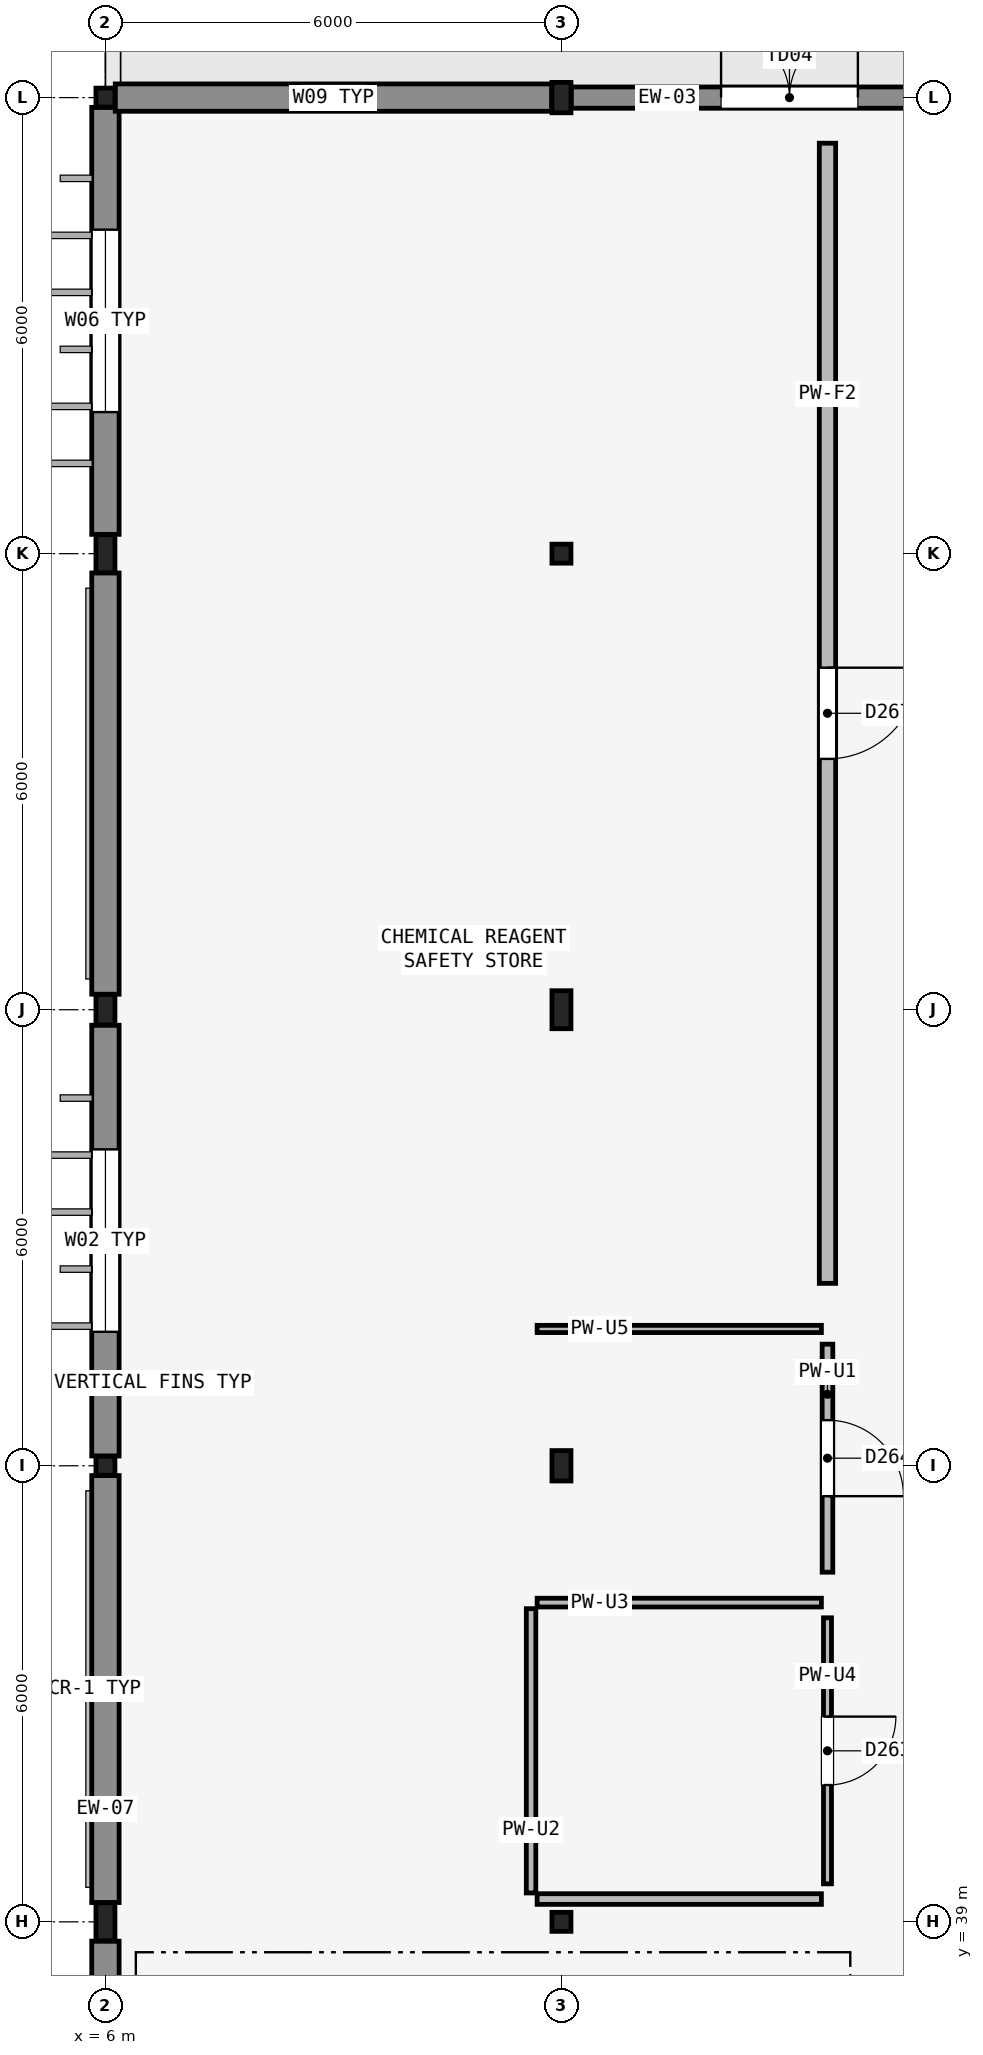
"""IFC4 building model, lengths in metres.
Left out: names, types, materials, properties, quantities, classifications, styles, units other than length and angle.
Written with IfcOpenShell. Run it as: python <this file> out.ifc"""

import sys

from ifc_helpers import new_model, si_unit, direction, frame, frame_2d, origin, origin_2d, place, context, subcontext, project, spatial, rectangle, hollow_rectangle, i_section, extrude, element, fill, save


model = new_model("IFC4")
c1 = context("Model", 3, precision=1e-05, world=origin(), true_north=direction((0.0, 1.0)))
c2 = subcontext(c1, "Body", "Model", "MODEL_VIEW")
j1 = project(units=[si_unit("LENGTHUNIT", "METRE"), si_unit("PLANEANGLEUNIT", "RADIAN")], contexts=[c1])
p1 = place(None, origin())
s1 = spatial("IfcSite", under=j1, at=p1, CompositionType="ELEMENT")
p2 = place(p1, origin())
s2 = spatial("IfcBuilding", under=s1, at=p2, CompositionType="ELEMENT")
p3 = place(p2, frame((0.0, 0.0, 18.0)))
s3 = spatial("IfcBuildingStorey", under=s2, at=p3, CompositionType="ELEMENT", Elevation=18.0)
p4 = place(p3, frame((6.0, 39.0, 0.0), z_axis=(0.0, 0.0, 1.0), x_axis=(1.0, 0.0, 0.0)))
e1 = element("IfcColumn", 1, at=p4, inside=s3, PredefinedType="COLUMN", context=c2, shape_type="SweptSolid", body=[
    extrude(i_section(OverallWidth=0.25, OverallDepth=0.5, WebThickness=0.01, FlangeThickness=0.015, FilletRadius=0.015, at=origin_2d()), origin(), (0.0, 0.0, 1.0), 4.2),
])
p5 = place(p3, frame((6.0, 45.0, 0.0), z_axis=(0.0, 0.0, 1.0), x_axis=(1.0, 0.0, 0.0)))
e2 = element("IfcColumn", 2, at=p5, inside=s3, PredefinedType="COLUMN", context=c2, shape_type="SweptSolid", body=[
    extrude(hollow_rectangle(XDim=0.25, YDim=0.25, WallThickness=0.012, InnerFilletRadius=0.012, OuterFilletRadius=0.024, at=origin_2d()), origin(), (0.0, 0.0, 1.0), 4.2),
])
p6 = place(p3, frame((6.0, 51.0, 0.0), z_axis=(0.0, 0.0, 1.0), x_axis=(1.0, 0.0, 0.0)))
e3 = element("IfcColumn", 3, at=p6, inside=s3, PredefinedType="COLUMN", context=c2, shape_type="SweptSolid", body=[
    extrude(i_section(OverallWidth=0.25, OverallDepth=0.4, WebThickness=0.01, FlangeThickness=0.013, FilletRadius=0.014, at=origin_2d()), origin(), (0.0, 0.0, 1.0), 4.2),
])
p7 = place(p3, frame((6.0, 57.0, 0.0), z_axis=(0.0, 0.0, 1.0), x_axis=(1.0, 0.0, 0.0)))
e4 = element("IfcColumn", 4, at=p7, inside=s3, PredefinedType="COLUMN", context=c2, shape_type="SweptSolid", body=[
    extrude(i_section(OverallWidth=0.25, OverallDepth=0.5, WebThickness=0.01, FlangeThickness=0.015, FilletRadius=0.015, at=origin_2d()), origin(), (0.0, 0.0, 1.0), 4.2),
])
for number, where, z_axis, x_axis in (
    (5, (6.0, 63.0, 0.0), (0.0, 0.0, 1.0), (1.0, 0.0, 0.0)),
    (6, (12.0, 39.0, 0.0), (0.0, 0.0, 1.0), (1.0, 0.0, 0.0)),
):
    element("IfcColumn", number, at=place(p3, frame(where, z_axis=z_axis, x_axis=x_axis)), inside=s3, PredefinedType="COLUMN", context=c2, shape_type="SweptSolid", body=[
        extrude(hollow_rectangle(XDim=0.25, YDim=0.25, WallThickness=0.012, InnerFilletRadius=0.012, OuterFilletRadius=0.024, at=origin_2d()), origin(), (0.0, 0.0, 1.0), 4.2),
    ])
p8 = place(p3, frame((12.0, 45.0, 0.0), z_axis=(0.0, 0.0, 1.0), x_axis=(1.0, 0.0, 0.0)))
e7 = element("IfcColumn", 7, at=p8, inside=s3, PredefinedType="COLUMN", context=c2, shape_type="SweptSolid", body=[
    extrude(i_section(OverallWidth=0.25, OverallDepth=0.4, WebThickness=0.01, FlangeThickness=0.013, FilletRadius=0.014, at=origin_2d()), origin(), (0.0, 0.0, 1.0), 4.2),
])
p9 = place(p3, frame((12.0, 51.0, 0.0), z_axis=(0.0, 0.0, 1.0), x_axis=(1.0, 0.0, 0.0)))
e8 = element("IfcColumn", 8, at=p9, inside=s3, PredefinedType="COLUMN", context=c2, shape_type="SweptSolid", body=[
    extrude(i_section(OverallWidth=0.25, OverallDepth=0.5, WebThickness=0.01, FlangeThickness=0.015, FilletRadius=0.015, at=origin_2d()), origin(), (0.0, 0.0, 1.0), 4.2),
])
p10 = place(p3, frame((12.0, 57.0, 0.0), z_axis=(0.0, 0.0, 1.0), x_axis=(1.0, 0.0, 0.0)))
e9 = element("IfcColumn", 9, at=p10, inside=s3, PredefinedType="COLUMN", context=c2, shape_type="SweptSolid", body=[
    extrude(hollow_rectangle(XDim=0.25, YDim=0.25, WallThickness=0.012, InnerFilletRadius=0.012, OuterFilletRadius=0.024, at=origin_2d()), origin(), (0.0, 0.0, 1.0), 4.2),
])
p11 = place(p3, frame((12.0, 63.0, 0.0), z_axis=(0.0, 0.0, 1.0), x_axis=(1.0, 0.0, 0.0)))
e10 = element("IfcColumn", 10, at=p11, inside=s3, PredefinedType="COLUMN", context=c2, shape_type="SweptSolid", body=[
    extrude(i_section(OverallWidth=0.25, OverallDepth=0.4, WebThickness=0.01, FlangeThickness=0.013, FilletRadius=0.014, at=origin_2d()), origin(), (0.0, 0.0, 1.0), 4.2),
])
p12 = place(p3, frame((6.0, 33.204, 0.0), z_axis=(0.0, 0.0, 1.0), x_axis=(0.0, 1.0, 0.0)))
e11 = element("IfcWall", 11, at=p12, inside=s3, PredefinedType="SOLIDWALL", context=c2, shape_type="SweptSolid", body=[
    extrude(rectangle(XDim=5.542, YDim=0.36, at=frame_2d((2.771, 0.0))), origin(), (0.0, 0.0, 1.0), 3.39),
])
p13 = place(p12, frame((1.171, 0.0, 0.8)))
e12 = element("IfcOpeningElement", 12, at=p13, cuts=e11, PredefinedType="OPENING", context=c2, shape_type="SweptSolid", body=[
    extrude(rectangle(XDim=3.2, YDim=1.8, at=frame_2d((1.6, 0.9))), frame((0.0, 0.19, 0.0), z_axis=(0.0, -1.0, 0.0), x_axis=(1.0, 0.0, 0.0)), (0.0, 0.0, 1.0), 0.38),
])
p14 = place(p3, frame((6.0, 39.254, 0.0), z_axis=(0.0, 0.0, 1.0), x_axis=(0.0, 1.0, 0.0)))
e13 = element("IfcWall", 13, at=p14, inside=s3, PredefinedType="SOLIDWALL", context=c2, shape_type="SweptSolid", body=[
    extrude(rectangle(XDim=5.617, YDim=0.36, at=frame_2d((2.809, 0.0))), origin(), (0.0, 0.0, 1.0), 3.29),
])
p15 = place(p3, frame((6.0, 45.129, 0.0), z_axis=(0.0, 0.0, 1.0), x_axis=(0.0, 1.0, 0.0)))
e14 = element("IfcWall", 14, at=p15, inside=s3, PredefinedType="SOLIDWALL", context=c2, shape_type="SweptSolid", body=[
    extrude(rectangle(XDim=5.667, YDim=0.36, at=frame_2d((2.833, 0.0))), origin(), (0.0, 0.0, 1.0), 3.29),
])
p16 = place(p15, frame((1.634, 0.0, 0.9)))
e15 = element("IfcOpeningElement", 15, at=p16, cuts=e14, PredefinedType="OPENING", context=c2, shape_type="SweptSolid", body=[
    extrude(rectangle(XDim=2.4, YDim=1.5, at=frame_2d((1.2, 0.75))), frame((0.0, 0.19, 0.0), z_axis=(0.0, -1.0, 0.0), x_axis=(1.0, 0.0, 0.0)), (0.0, 0.0, 1.0), 0.38),
])
p17 = place(p3, frame((6.0, 51.204, 0.0), z_axis=(0.0, 0.0, 1.0), x_axis=(0.0, 1.0, 0.0)))
e16 = element("IfcWall", 16, at=p17, inside=s3, PredefinedType="SOLIDWALL", context=c2, shape_type="SweptSolid", body=[
    extrude(rectangle(XDim=5.542, YDim=0.36, at=frame_2d((2.771, 0.0))), origin(), (0.0, 0.0, 1.0), 3.29),
])
p18 = place(p3, frame((6.0, 57.254, 0.0), z_axis=(0.0, 0.0, 1.0), x_axis=(0.0, 1.0, 0.0)))
e17 = element("IfcWall", 17, at=p18, inside=s3, PredefinedType="SOLIDWALL", context=c2, shape_type="SweptSolid", body=[
    extrude(rectangle(XDim=5.617, YDim=0.36, at=frame_2d((2.809, 0.0))), origin(), (0.0, 0.0, 1.0), 3.29),
])
p19 = place(p18, frame((1.608, 0.0, 1.1)))
e18 = element("IfcOpeningElement", 18, at=p19, cuts=e17, PredefinedType="OPENING", context=c2, shape_type="SweptSolid", body=[
    extrude(rectangle(XDim=2.4, YDim=1.2, at=frame_2d((1.2, 0.6))), frame((0.0, 0.19, 0.0), z_axis=(0.0, -1.0, 0.0), x_axis=(1.0, 0.0, 0.0)), (0.0, 0.0, 1.0), 0.38),
])
p20 = place(p3, frame((6.129, 63.0, 0.0), z_axis=(0.0, 0.0, 1.0), x_axis=(1.0, 0.0, 0.0)))
e19 = element("IfcWall", 19, at=p20, inside=s3, PredefinedType="SOLIDWALL", context=c2, shape_type="SweptSolid", body=[
    extrude(rectangle(XDim=5.742, YDim=0.36, at=frame_2d((2.871, 0.0))), origin(), (0.0, 0.0, 1.0), 3.29),
])
p21 = place(p20, frame((2.421, 0.0, 1.0)))
e20 = element("IfcOpeningElement", 20, at=p21, cuts=e19, PredefinedType="OPENING", context=c2, shape_type="SweptSolid", body=[
    extrude(rectangle(XDim=0.9, YDim=1.5, at=frame_2d((0.45, 0.75))), frame((0.0, 0.19, 0.0), z_axis=(0.0, -1.0, 0.0), x_axis=(1.0, 0.0, 0.0)), (0.0, 0.0, 1.0), 0.38),
])
p22 = place(p3, frame((12.129, 63.0, 0.0), z_axis=(0.0, 0.0, 1.0), x_axis=(1.0, 0.0, 0.0)))
e21 = element("IfcWall", 21, at=p22, inside=s3, PredefinedType="SOLIDWALL", context=c2, shape_type="SweptSolid", body=[
    extrude(rectangle(XDim=5.742, YDim=0.28, at=frame_2d((2.871, 0.0))), origin(), (0.0, 0.0, 1.0), 3.29),
])
p23 = place(p22, frame((1.971, 0.0, 0.0)))
e22 = element("IfcOpeningElement", 22, at=p23, cuts=e21, PredefinedType="OPENING", context=c2, shape_type="SweptSolid", body=[
    extrude(rectangle(XDim=1.8, YDim=2.3, at=frame_2d((0.9, 1.15))), frame((0.0, 0.15, 0.0), z_axis=(0.0, -1.0, 0.0), x_axis=(1.0, 0.0, 0.0)), (0.0, 0.0, 1.0), 0.3),
])
p24 = place(p3, frame((15.5, 43.0, 0.0), z_axis=(0.0, 0.0, 1.0), x_axis=(0.0, -1.0, 0.0)))
e23 = element("IfcWall", 23, at=p24, inside=s3, PredefinedType="PARTITIONING", context=c2, shape_type="SweptSolid", body=[
    extrude(rectangle(XDim=3.5, YDim=0.105, at=frame_2d((1.75, 0.0))), origin(), (0.0, 0.0, 1.0), 3.89),
])
p25 = place(p24, frame((1.3, 0.0, 0.0)))
e24 = element("IfcOpeningElement", 24, at=p25, cuts=e23, PredefinedType="OPENING", context=c2, shape_type="SweptSolid", body=[
    extrude(rectangle(XDim=0.9, YDim=2.1, at=frame_2d((0.45, 1.05))), frame((0.0, 0.062, 0.0), z_axis=(0.0, -1.0, 0.0), x_axis=(1.0, 0.0, 0.0)), (0.0, 0.0, 1.0), 0.125),
])
p26 = place(p3, frame((15.5, 46.6, 0.0), z_axis=(0.0, 0.0, 1.0), x_axis=(0.0, -1.0, 0.0)))
e25 = element("IfcWall", 25, at=p26, inside=s3, PredefinedType="PARTITIONING", context=c2, shape_type="SweptSolid", body=[
    extrude(rectangle(XDim=3.0, YDim=0.14, at=frame_2d((1.5, 0.0))), origin(), (0.0, 0.0, 1.0), 3.39),
])
p27 = place(p26, frame((1.0, 0.0, 0.0)))
e26 = element("IfcOpeningElement", 26, at=p27, cuts=e25, PredefinedType="OPENING", context=c2, shape_type="SweptSolid", body=[
    extrude(rectangle(XDim=1.0, YDim=2.1, at=frame_2d((0.5, 1.05))), frame((0.0, 0.08, 0.0), z_axis=(0.0, -1.0, 0.0), x_axis=(1.0, 0.0, 0.0)), (0.0, 0.0, 1.0), 0.16),
])
p28 = place(p3, frame((15.5, 62.4, 0.0), z_axis=(0.0, 0.0, 1.0), x_axis=(0.0, -1.0, 0.0)))
e27 = element("IfcWall", 27, at=p28, inside=s3, PredefinedType="PARTITIONING", context=c2, shape_type="SweptSolid", body=[
    extrude(rectangle(XDim=15.0, YDim=0.215, at=frame_2d((7.5, 0.0))), origin(), (0.0, 0.0, 1.0), 3.39),
])
p29 = place(p28, frame((6.9, 0.0, 0.0)))
e28 = element("IfcOpeningElement", 28, at=p29, cuts=e27, PredefinedType="OPENING", context=c2, shape_type="SweptSolid", body=[
    extrude(rectangle(XDim=1.2, YDim=2.15, at=frame_2d((0.6, 1.075))), frame((0.0, 0.117, 0.0), z_axis=(0.0, -1.0, 0.0), x_axis=(1.0, 0.0, 0.0)), (0.0, 0.0, 1.0), 0.235),
])
p30 = place(p3, frame((15.42, 39.3, 0.0), z_axis=(0.0, 0.0, 1.0), x_axis=(-1.0, 0.0, 0.0)))
e29 = element("IfcWall", 29, at=p30, inside=s3, PredefinedType="PARTITIONING", context=c2, shape_type="SweptSolid", body=[
    extrude(rectangle(XDim=3.74, YDim=0.14, at=frame_2d((1.87, 0.0))), origin(), (0.0, 0.0, 1.0), 3.44),
])
p31 = place(p3, frame((11.6, 39.38, 0.0), z_axis=(0.0, 0.0, 1.0), x_axis=(0.0, 1.0, 0.0)))
e30 = element("IfcWall", 30, at=p31, inside=s3, PredefinedType="PARTITIONING", context=c2, shape_type="SweptSolid", body=[
    extrude(rectangle(XDim=3.74, YDim=0.125, at=frame_2d((1.87, 0.0))), origin(), (0.0, 0.0, 1.0), 3.89),
])
p32 = place(p3, frame((11.68, 43.2, 0.0), z_axis=(0.0, 0.0, 1.0), x_axis=(1.0, 0.0, 0.0)))
e31 = element("IfcWall", 31, at=p32, inside=s3, PredefinedType="PARTITIONING", context=c2, shape_type="SweptSolid", body=[
    extrude(rectangle(XDim=3.74, YDim=0.115, at=frame_2d((1.87, 0.0))), origin(), (0.0, 0.0, 1.0), 3.44),
])
p33 = place(p3, frame((11.68, 46.8, 0.0), z_axis=(0.0, 0.0, 1.0), x_axis=(1.0, 0.0, 0.0)))
e32 = element("IfcWall", 32, at=p33, inside=s3, PredefinedType="PARTITIONING", context=c2, shape_type="SweptSolid", body=[
    extrude(rectangle(XDim=3.74, YDim=0.095, at=frame_2d((1.87, 0.0))), origin(), (0.0, 0.0, 1.0), 3.49),
])
p34 = place(p16, origin())
e33 = element("IfcWindow", 33, at=p34, inside=s3, PartitioningType="SINGLE_PANEL", PredefinedType="WINDOW", context=c2, shape_type="SweptSolid", body=[
    extrude(rectangle(XDim=2.4, YDim=1.5, at=frame_2d((1.2, 0.75))), frame((0.0, 0.03, 0.0), z_axis=(0.0, -1.0, 0.0), x_axis=(1.0, 0.0, 0.0)), (0.0, 0.0, 1.0), 0.06),
])
fill(e15, e33)
p35 = place(p19, origin())
e34 = element("IfcWindow", 34, at=p35, inside=s3, PartitioningType="SINGLE_PANEL", PredefinedType="WINDOW", context=c2, shape_type="SweptSolid", body=[
    extrude(rectangle(XDim=2.4, YDim=1.2, at=frame_2d((1.2, 0.6))), frame((0.0, 0.03, 0.0), z_axis=(0.0, -1.0, 0.0), x_axis=(1.0, 0.0, 0.0)), (0.0, 0.0, 1.0), 0.06),
])
fill(e18, e34)
p36 = place(p21, origin())
e35 = element("IfcWindow", 35, at=p36, inside=s3, PartitioningType="SINGLE_PANEL", PredefinedType="WINDOW", context=c2, shape_type="SweptSolid", body=[
    extrude(rectangle(XDim=0.9, YDim=1.5, at=frame_2d((0.45, 0.75))), frame((0.0, 0.03, 0.0), z_axis=(0.0, -1.0, 0.0), x_axis=(1.0, 0.0, 0.0)), (0.0, 0.0, 1.0), 0.06),
])
fill(e20, e35)
p37 = place(p23, origin())
e36 = element("IfcDoor", 36, at=p37, inside=s3, OperationType="DOUBLE_DOOR_SINGLE_SWING", PredefinedType="DOOR", context=c2, shape_type="SweptSolid", body=[
    extrude(rectangle(XDim=1.8, YDim=2.3, at=frame_2d((0.9, 1.15))), frame((0.0, 0.025, 0.0), z_axis=(0.0, -1.0, 0.0), x_axis=(1.0, 0.0, 0.0)), (0.0, 0.0, 1.0), 0.05),
])
fill(e22, e36)
p38 = place(p25, origin())
e37 = element("IfcDoor", 37, at=p38, inside=s3, OperationType="SINGLE_SWING_LEFT", PredefinedType="DOOR", context=c2, shape_type="SweptSolid", body=[
    extrude(rectangle(XDim=0.9, YDim=2.1, at=frame_2d((0.45, 1.05))), frame((0.0, 0.025, 0.0), z_axis=(0.0, -1.0, 0.0), x_axis=(1.0, 0.0, 0.0)), (0.0, 0.0, 1.0), 0.05),
])
fill(e24, e37)
p39 = place(p27, origin())
e38 = element("IfcDoor", 38, at=p39, inside=s3, OperationType="SINGLE_SWING_RIGHT", PredefinedType="DOOR", context=c2, shape_type="SweptSolid", body=[
    extrude(rectangle(XDim=1.0, YDim=2.1, at=frame_2d((0.5, 1.05))), frame((0.0, 0.025, 0.0), z_axis=(0.0, -1.0, 0.0), x_axis=(1.0, 0.0, 0.0)), (0.0, 0.0, 1.0), 0.05),
])
fill(e26, e38)
p40 = place(p29, origin())
e39 = element("IfcDoor", 39, at=p40, inside=s3, OperationType="SINGLE_SWING_LEFT", PredefinedType="DOOR", context=c2, shape_type="SweptSolid", body=[
    extrude(rectangle(XDim=1.2, YDim=2.15, at=frame_2d((0.6, 1.075))), frame((0.0, 0.025, 0.0), z_axis=(0.0, -1.0, 0.0), x_axis=(1.0, 0.0, 0.0)), (0.0, 0.0, 1.0), 0.05),
])
fill(e28, e39)
save(model, sys.argv[1])
